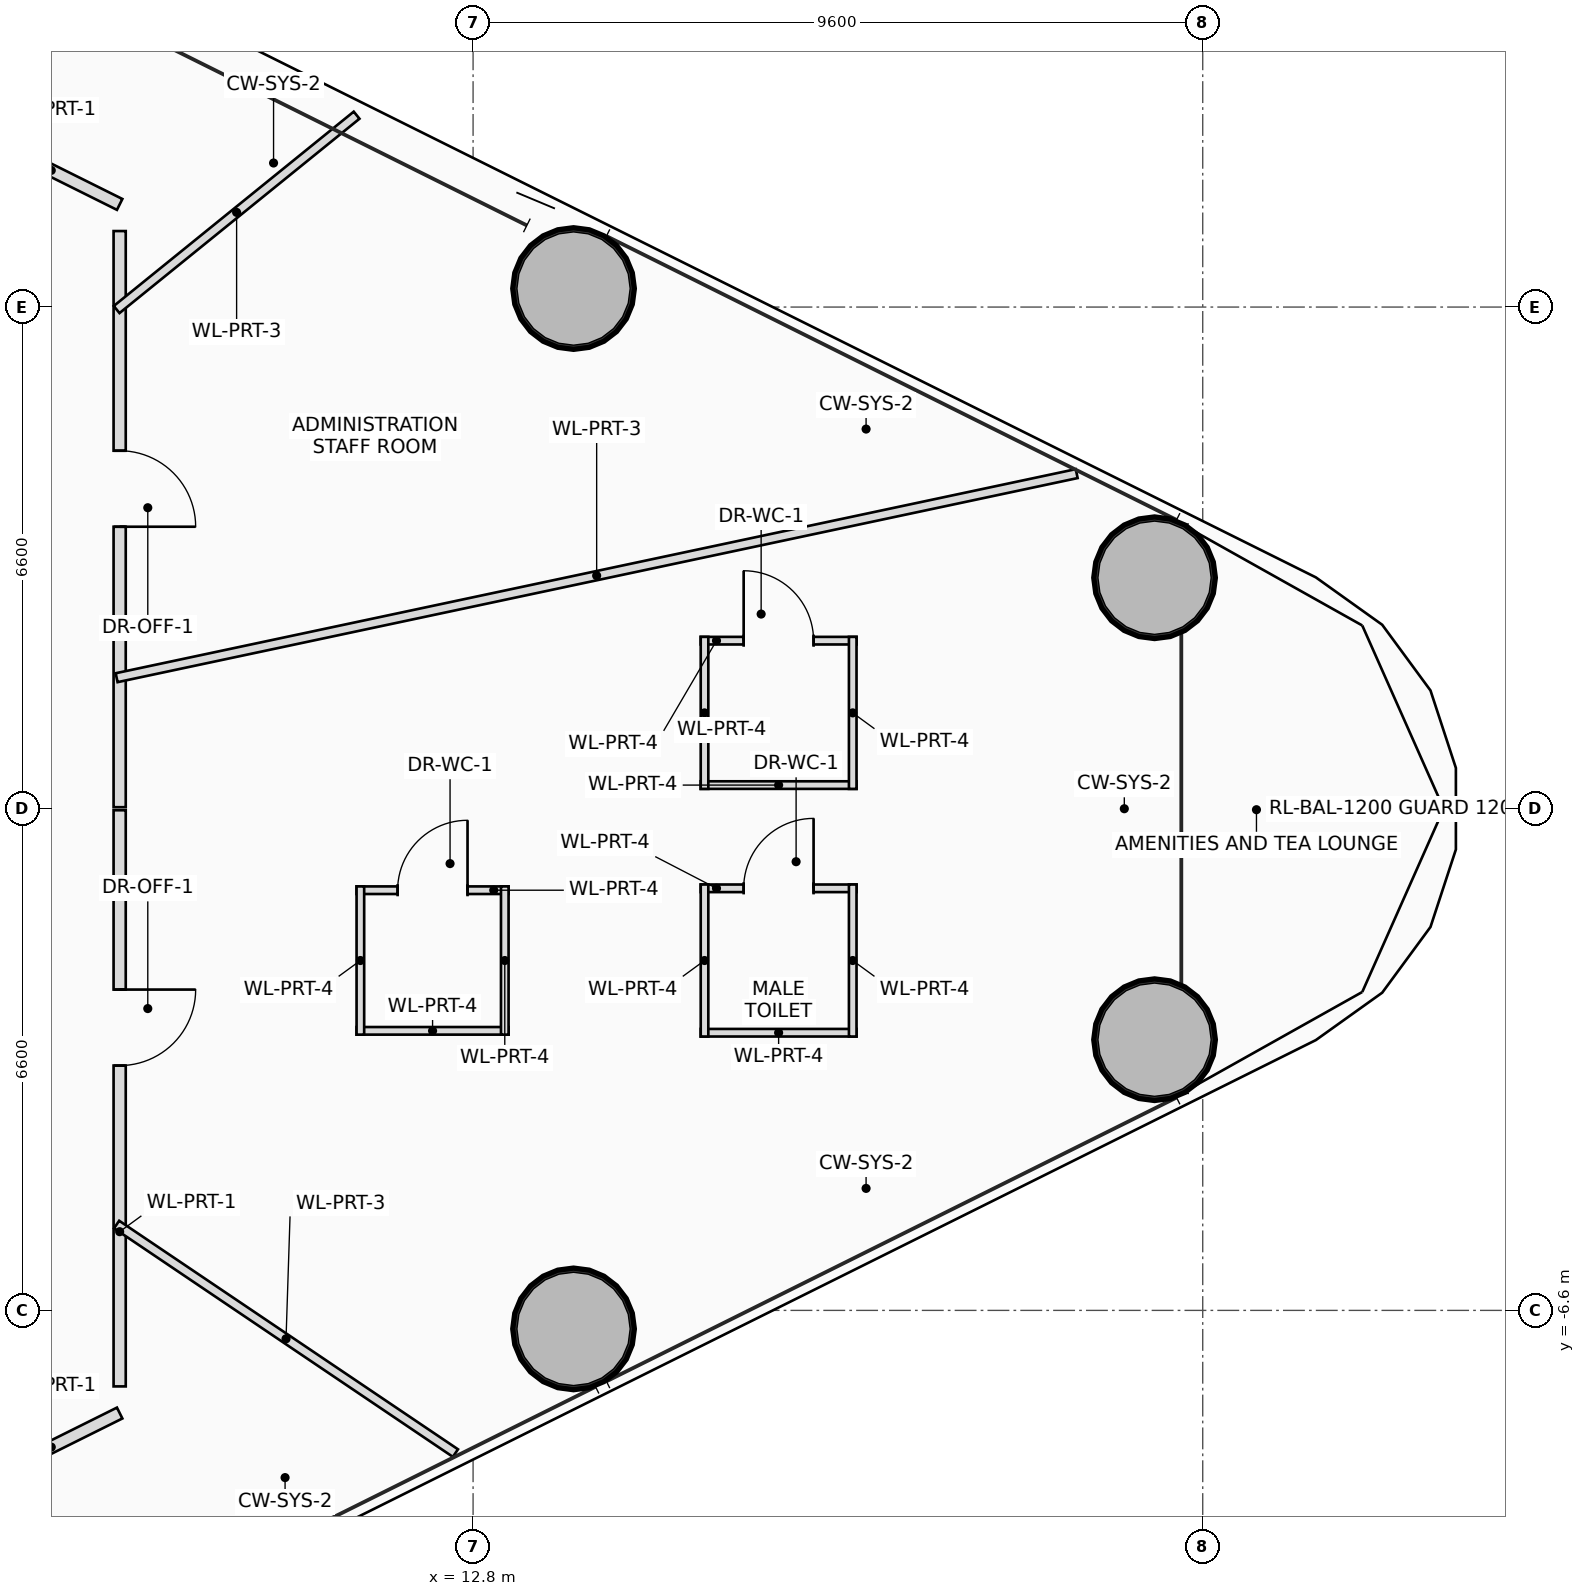
"""IFC4 building model, lengths in metres.
Left out: names, types, materials, properties, quantities, classifications, styles, units other than length and angle.
Written with IfcOpenShell. Run it as: python <this file> out.ifc"""

import sys

from ifc_helpers import new_model, si_unit, direction, frame, frame_2d, origin, origin_2d, place, context, subcontext, project, spatial, rectangle, hollow_circle, extrude, source, transform, mapped, element, fill, save


model = new_model("IFC4")
c1 = context("Model", 3, precision=1e-05, world=origin(), true_north=direction((0.0, 1.0)))
c2 = subcontext(c1, "Body", "Model", "MODEL_VIEW")
j1 = project(units=[si_unit("LENGTHUNIT", "METRE"), si_unit("PLANEANGLEUNIT", "RADIAN")], contexts=[c1])
p1 = place(None, origin())
s1 = spatial("IfcSite", under=j1, at=p1, CompositionType="ELEMENT")
p2 = place(p1, origin())
s2 = spatial("IfcBuilding", under=s1, at=p2, CompositionType="ELEMENT")
p3 = place(p2, frame((0.0, 0.0, 42.3)))
s3 = spatial("IfcBuildingStorey", under=s2, at=p3, CompositionType="ELEMENT", Elevation=42.3)
m1 = source(origin(), c2, "Body", "SweptSolid", [
    extrude(hollow_circle(Radius=0.8, WallThickness=0.055, at=origin_2d()), origin(), (0.0, 0.0, 1.0), 3.7),
])
for number, where, z_axis, x_axis in (
    (1, (14.122, -6.844, 0.0), (0.0, 0.0, 1.0), (1.0, 0.0, 0.0)),
    (2, (21.766, -3.039, 0.0), (0.0, 0.0, 1.0), (1.0, 0.0, 0.0)),
    (3, (21.766, 3.039, 0.0), (0.0, 0.0, 1.0), (1.0, 0.0, 0.0)),
    (4, (14.122, 6.844, 0.0), (0.0, 0.0, 1.0), (1.0, 0.0, 0.0)),
    (5, (6.477, 10.648, 0.0), (0.0, 0.0, 1.0), (1.0, 0.0, 0.0)),
):
    element("IfcColumn", number, at=place(p3, frame(where, z_axis=z_axis, x_axis=x_axis)), inside=s3, PredefinedType="COLUMN", context=c2, shape_type="MappedRepresentation", body=[
        mapped(m1, transform((0.0, 0.0, 0.0), scale=1.0)),
    ])
p4 = place(p3, frame((15.795, -1.047, 0.0), z_axis=(0.0, 0.0, 1.0), x_axis=(1.0, 0.0, 0.0)))
e6 = element("IfcWall", 6, at=p4, inside=s3, PredefinedType="PARTITIONING", context=c2, shape_type="SweptSolid", body=[
    extrude(rectangle(XDim=2.05, YDim=0.1, at=frame_2d((1.025, 0.0))), origin(), (0.0, 0.0, 1.0), 3.15),
])
p5 = place(p4, frame((0.565, 0.0, 0.0)))
e7 = element("IfcOpeningElement", 7, at=p5, cuts=e6, PredefinedType="OPENING", context=c2, shape_type="SweptSolid", body=[
    extrude(rectangle(XDim=0.92, YDim=2.1, at=frame_2d((0.46, 1.05))), frame((0.0, 0.06, 0.0), z_axis=(0.0, -1.0, 0.0), x_axis=(1.0, 0.0, 0.0)), (0.0, 0.0, 1.0), 0.12),
])
p6 = place(p3, frame((17.845, -2.947, 0.0), z_axis=(0.0, 0.0, 1.0), x_axis=(-1.0, 0.0, 0.0)))
e8 = element("IfcWall", 8, at=p6, inside=s3, PredefinedType="PARTITIONING", context=c2, shape_type="SweptSolid", body=[
    extrude(rectangle(XDim=2.05, YDim=0.1, at=frame_2d((1.025, 0.0))), origin(), (0.0, 0.0, 1.0), 3.15),
])
p7 = place(p3, frame((17.795, -0.997, 0.0), z_axis=(0.0, 0.0, 1.0), x_axis=(0.0, -1.0, 0.0)))
e9 = element("IfcWall", 9, at=p7, inside=s3, PredefinedType="PARTITIONING", context=c2, shape_type="SweptSolid", body=[
    extrude(rectangle(XDim=2.0, YDim=0.1, at=frame_2d((1.0, 0.0))), origin(), (0.0, 0.0, 1.0), 3.15),
])
p8 = place(p3, frame((15.845, -2.997, 0.0), z_axis=(0.0, 0.0, 1.0), x_axis=(0.0, 1.0, 0.0)))
e10 = element("IfcWall", 10, at=p8, inside=s3, PredefinedType="PARTITIONING", context=c2, shape_type="SweptSolid", body=[
    extrude(rectangle(XDim=2.0, YDim=0.1, at=frame_2d((1.0, 0.0))), origin(), (0.0, 0.0, 1.0), 3.495),
])
p9 = place(p3, frame((15.795, 2.211, 0.0), z_axis=(0.0, 0.0, 1.0), x_axis=(1.0, 0.0, 0.0)))
e11 = element("IfcWall", 11, at=p9, inside=s3, PredefinedType="PARTITIONING", context=c2, shape_type="SweptSolid", body=[
    extrude(rectangle(XDim=2.05, YDim=0.1, at=frame_2d((1.025, 0.0))), origin(), (0.0, 0.0, 1.0), 3.15),
])
p10 = place(p9, frame((0.565, 0.0, 0.0)))
e12 = element("IfcOpeningElement", 12, at=p10, cuts=e11, PredefinedType="OPENING", context=c2, shape_type="SweptSolid", body=[
    extrude(rectangle(XDim=0.92, YDim=2.1, at=frame_2d((0.46, 1.05))), frame((0.0, 0.06, 0.0), z_axis=(0.0, -1.0, 0.0), x_axis=(1.0, 0.0, 0.0)), (0.0, 0.0, 1.0), 0.12),
])
p11 = place(p3, frame((17.845, 0.311, 0.0), z_axis=(0.0, 0.0, 1.0), x_axis=(-1.0, 0.0, 0.0)))
e13 = element("IfcWall", 13, at=p11, inside=s3, PredefinedType="PARTITIONING", context=c2, shape_type="SweptSolid", body=[
    extrude(rectangle(XDim=2.05, YDim=0.1, at=frame_2d((1.025, 0.0))), origin(), (0.0, 0.0, 1.0), 3.15),
])
p12 = place(p3, frame((17.795, 2.261, 0.0), z_axis=(0.0, 0.0, 1.0), x_axis=(0.0, -1.0, 0.0)))
e14 = element("IfcWall", 14, at=p12, inside=s3, PredefinedType="PARTITIONING", context=c2, shape_type="SweptSolid", body=[
    extrude(rectangle(XDim=2.0, YDim=0.1, at=frame_2d((1.0, 0.0))), origin(), (0.0, 0.0, 1.0), 3.15),
])
p13 = place(p3, frame((15.845, 0.261, 0.0), z_axis=(0.0, 0.0, 1.0), x_axis=(0.0, 1.0, 0.0)))
e15 = element("IfcWall", 15, at=p13, inside=s3, PredefinedType="PARTITIONING", context=c2, shape_type="SweptSolid", body=[
    extrude(rectangle(XDim=2.0, YDim=0.1, at=frame_2d((1.0, 0.0))), origin(), (0.0, 0.0, 1.0), 3.495),
])
p14 = place(p3, frame((11.267, -1.072, 0.0), z_axis=(0.0, 0.0, 1.0), x_axis=(1.0, 0.0, 0.0)))
e16 = element("IfcWall", 16, at=p14, inside=s3, PredefinedType="PARTITIONING", context=c2, shape_type="SweptSolid", body=[
    extrude(rectangle(XDim=2.0, YDim=0.1, at=frame_2d((1.0, 0.0))), origin(), (0.0, 0.0, 1.0), 3.15),
])
p15 = place(p14, frame((0.54, 0.0, 0.0)))
e17 = element("IfcOpeningElement", 17, at=p15, cuts=e16, PredefinedType="OPENING", context=c2, shape_type="SweptSolid", body=[
    extrude(rectangle(XDim=0.92, YDim=2.1, at=frame_2d((0.46, 1.05))), frame((0.0, 0.06, 0.0), z_axis=(0.0, -1.0, 0.0), x_axis=(1.0, 0.0, 0.0)), (0.0, 0.0, 1.0), 0.12),
])
p16 = place(p3, frame((13.267, -2.922, 0.0), z_axis=(0.0, 0.0, 1.0), x_axis=(-1.0, 0.0, 0.0)))
e18 = element("IfcWall", 18, at=p16, inside=s3, PredefinedType="PARTITIONING", context=c2, shape_type="SweptSolid", body=[
    extrude(rectangle(XDim=2.0, YDim=0.1, at=frame_2d((1.0, 0.0))), origin(), (0.0, 0.0, 1.0), 3.15),
])
for number, where, z_axis, x_axis in (
    (19, (13.217, -1.022, 0.0), (0.0, 0.0, 1.0), (0.0, -1.0, 0.0)),
    (20, (11.317, -2.972, 0.0), (0.0, 0.0, 1.0), (0.0, 1.0, 0.0)),
):
    element("IfcWall", number, at=place(p3, frame(where, z_axis=z_axis, x_axis=x_axis)), inside=s3, PredefinedType="PARTITIONING", context=c2, shape_type="SweptSolid", body=[
        extrude(rectangle(XDim=1.95, YDim=0.1, at=frame_2d((0.975, 0.0))), origin(), (0.0, 0.0, 1.0), 3.495),
    ])
p17 = place(p3, frame((6.35, 8.846, 0.0), z_axis=(0.0, 0.0, 1.0), x_axis=(0.895251454268, -0.445561256879, 0.0)))
e21 = element("IfcWall", 21, at=p17, inside=s3, PredefinedType="PARTITIONING", context=c2, shape_type="SweptSolid", body=[
    extrude(rectangle(XDim=2.01, YDim=0.16, at=frame_2d((1.005, 0.0))), origin(), (0.0, 0.0, 1.0), 2.8),
])
p18 = place(p3, frame((8.15, 7.6, 0.0), z_axis=(0.0, 0.0, 1.0), x_axis=(0.0, -1.0, 0.0)))
e22 = element("IfcWall", 22, at=p18, inside=s3, PredefinedType="PARTITIONING", context=c2, shape_type="SweptSolid", body=[
    extrude(rectangle(XDim=7.58, YDim=0.16, at=frame_2d((3.79, 0.0))), origin(), (0.0, 0.0, 1.0), 2.8),
])
p19 = place(p18, frame((2.89, 0.0, 0.0)))
e23 = element("IfcOpeningElement", 23, at=p19, cuts=e22, PredefinedType="OPENING", context=c2, shape_type="SweptSolid", body=[
    extrude(rectangle(XDim=1.0, YDim=2.25, at=frame_2d((0.5, 1.125))), frame((0.0, 0.09, 0.0), z_axis=(0.0, -1.0, 0.0), x_axis=(1.0, 0.0, 0.0)), (0.0, 0.0, 1.0), 0.18),
])
p20 = place(p3, frame((8.15, -0.02, 0.0), z_axis=(0.0, 0.0, 1.0), x_axis=(0.0, -1.0, 0.0)))
e24 = element("IfcWall", 24, at=p20, inside=s3, PredefinedType="PARTITIONING", context=c2, shape_type="SweptSolid", body=[
    extrude(rectangle(XDim=7.58, YDim=0.16, at=frame_2d((3.79, 0.0))), origin(), (0.0, 0.0, 1.0), 2.8),
])
p21 = place(p20, frame((2.359, 0.0, 0.0)))
e25 = element("IfcOpeningElement", 25, at=p21, cuts=e24, PredefinedType="OPENING", context=c2, shape_type="SweptSolid", body=[
    extrude(rectangle(XDim=1.0, YDim=2.25, at=frame_2d((0.5, 1.125))), frame((0.0, 0.09, 0.0), z_axis=(0.0, -1.0, 0.0), x_axis=(1.0, 0.0, 0.0)), (0.0, 0.0, 1.0), 0.18),
])
p22 = place(p3, frame((8.15, -7.95, 0.0), z_axis=(0.0, 0.0, 1.0), x_axis=(-0.895251454268, -0.445561256879, 0.0)))
e26 = element("IfcWall", 26, at=p22, inside=s3, PredefinedType="PARTITIONING", context=c2, shape_type="SweptSolid", body=[
    extrude(rectangle(XDim=2.01, YDim=0.16, at=frame_2d((1.005, 0.0))), origin(), (0.0, 0.0, 1.0), 2.8),
])
p23 = place(p3, frame((8.11, 6.567, 0.0), z_axis=(0.0, 0.0, 1.0), x_axis=(0.777144107081, 0.629322681007, 0.0)))
e27 = element("IfcWall", 27, at=p23, inside=s3, PredefinedType="PARTITIONING", context=c2, shape_type="SweptSolid", body=[
    extrude(rectangle(XDim=4.063, YDim=0.12, at=frame_2d((2.031, 0.0))), origin(), (0.0, 0.0, 1.0), 2.96),
])
p24 = place(p3, frame((8.11, -5.47, 0.0), z_axis=(0.0, 0.0, 1.0), x_axis=(0.829034436431, -0.559197552938, 0.0)))
e28 = element("IfcWall", 28, at=p24, inside=s3, PredefinedType="PARTITIONING", context=c2, shape_type="SweptSolid", body=[
    extrude(rectangle(XDim=5.377, YDim=0.12, at=frame_2d((2.688, 0.0))), origin(), (0.0, 0.0, 1.0), 2.8),
])
p25 = place(p3, frame((8.11, 1.724, 0.0), z_axis=(0.0, 0.0, 1.0), x_axis=(0.978149384457, 0.207903298882, 0.0)))
e29 = element("IfcWall", 29, at=p25, inside=s3, PredefinedType="PARTITIONING", context=c2, shape_type="SweptSolid", body=[
    extrude(rectangle(XDim=12.914, YDim=0.12, at=frame_2d((6.457, 0.0))), origin(), (0.0, 0.0, 1.0), 2.8),
])
p26 = place(p5, origin())
e30 = element("IfcDoor", 30, at=p26, inside=s3, OperationType="SINGLE_SWING_RIGHT", PredefinedType="DOOR", context=c2, shape_type="SweptSolid", body=[
    extrude(rectangle(XDim=0.92, YDim=2.1, at=frame_2d((0.46, 1.05))), frame((0.0, 0.025, 0.0), z_axis=(0.0, -1.0, 0.0), x_axis=(1.0, 0.0, 0.0)), (0.0, 0.0, 1.0), 0.05),
])
fill(e7, e30)
p27 = place(p10, origin())
e31 = element("IfcDoor", 31, at=p27, inside=s3, OperationType="SINGLE_SWING_LEFT", PredefinedType="DOOR", context=c2, shape_type="SweptSolid", body=[
    extrude(rectangle(XDim=0.92, YDim=2.1, at=frame_2d((0.46, 1.05))), frame((0.0, 0.025, 0.0), z_axis=(0.0, -1.0, 0.0), x_axis=(1.0, 0.0, 0.0)), (0.0, 0.0, 1.0), 0.05),
])
fill(e12, e31)
p28 = place(p15, origin())
e32 = element("IfcDoor", 32, at=p28, inside=s3, OperationType="SINGLE_SWING_RIGHT", PredefinedType="DOOR", context=c2, shape_type="SweptSolid", body=[
    extrude(rectangle(XDim=0.92, YDim=2.1, at=frame_2d((0.46, 1.05))), frame((0.0, 0.025, 0.0), z_axis=(0.0, -1.0, 0.0), x_axis=(1.0, 0.0, 0.0)), (0.0, 0.0, 1.0), 0.05),
])
fill(e17, e32)
p29 = place(p19, origin())
e33 = element("IfcDoor", 33, at=p29, inside=s3, OperationType="SINGLE_SWING_RIGHT", PredefinedType="DOOR", context=c2, shape_type="SweptSolid", body=[
    extrude(rectangle(XDim=1.0, YDim=2.25, at=frame_2d((0.5, 1.125))), frame((0.0, 0.025, 0.0), z_axis=(0.0, -1.0, 0.0), x_axis=(1.0, 0.0, 0.0)), (0.0, 0.0, 1.0), 0.05),
])
fill(e23, e33)
p30 = place(p21, origin())
e34 = element("IfcDoor", 34, at=p30, inside=s3, OperationType="SINGLE_SWING_LEFT", PredefinedType="DOOR", context=c2, shape_type="SweptSolid", body=[
    extrude(rectangle(XDim=1.0, YDim=2.25, at=frame_2d((0.5, 1.125))), frame((0.0, 0.025, 0.0), z_axis=(0.0, -1.0, 0.0), x_axis=(1.0, 0.0, 0.0)), (0.0, 0.0, 1.0), 0.05),
])
fill(e25, e34)
save(model, sys.argv[1])
